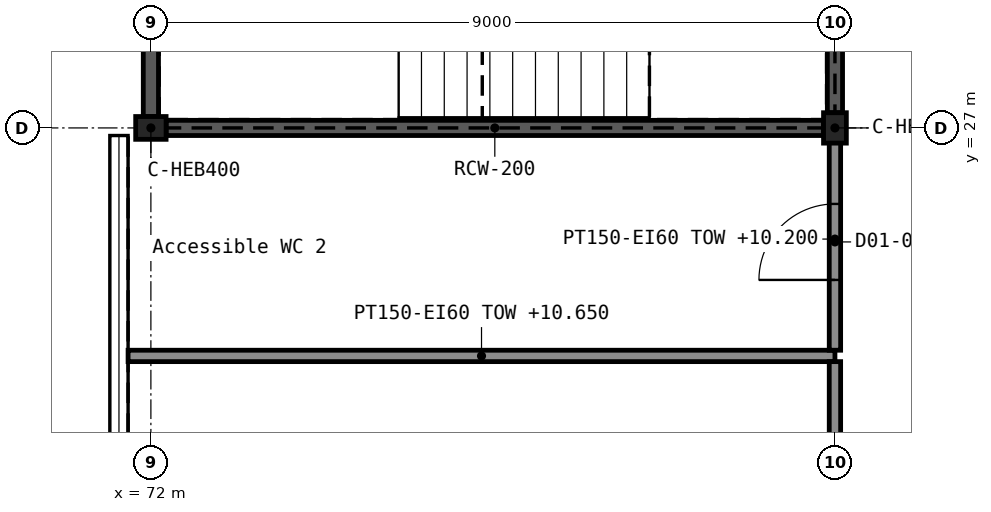
"""IFC4 building model, lengths in metres.
Left out: names, types, materials, properties, quantities, classifications, styles, units other than length and angle.
Written with IfcOpenShell. Run it as: python <this file> out.ifc"""

import sys

from ifc_helpers import new_model, si_unit, direction, frame, frame_2d, origin, origin_2d, place, context, subcontext, project, spatial, rectangle, i_section, extrude, element, fill, save


model = new_model("IFC4")
c1 = context("Model", 3, precision=1e-05, world=origin(), true_north=direction((0.0, 1.0)))
c2 = subcontext(c1, "Body", "Model", "MODEL_VIEW")
j1 = project(units=[si_unit("LENGTHUNIT", "METRE"), si_unit("PLANEANGLEUNIT", "RADIAN")], contexts=[c1])
p1 = place(None, origin())
s1 = spatial("IfcSite", under=j1, at=p1, CompositionType="ELEMENT")
p2 = place(p1, origin())
s2 = spatial("IfcBuilding", under=s1, at=p2, CompositionType="ELEMENT")
p3 = place(p2, frame((0.0, 0.0, 5.4)))
s3 = spatial("IfcBuildingStorey", under=s2, at=p3, CompositionType="ELEMENT", Elevation=5.4)
for number, where, z_axis, x_axis in (
    (1, (72.0, 27.0, 0.0), (0.0, 0.0, 1.0), (0.0, 1.0, 0.0)),
    (2, (81.0, 27.0, 0.0), (0.0, 0.0, 1.0), (1.0, 0.0, 0.0)),
):
    element("IfcColumn", number, at=place(p3, frame(where, z_axis=z_axis, x_axis=x_axis)), inside=s3, PredefinedType="COLUMN", context=c2, shape_type="SweptSolid", body=[
        extrude(i_section(OverallWidth=0.3, OverallDepth=0.4, WebThickness=0.013, FlangeThickness=0.024, FilletRadius=0.027, at=origin_2d()), origin(), (0.0, 0.0, 1.0), 5.4),
    ])
p4 = place(p3, frame((72.2, 27.0, 0.0), z_axis=(0.0, 0.0, 1.0), x_axis=(1.0, 0.0, 0.0)))
e3 = element("IfcWall", 3, at=p4, inside=s3, PredefinedType="SHEAR", context=c2, shape_type="SweptSolid", body=[
    extrude(rectangle(XDim=8.65, YDim=0.2, at=frame_2d((4.325, 0.0))), origin(), (0.0, 0.0, 1.0), 5.4),
])
p5 = place(p3, frame((72.0, 27.15, -0.15), z_axis=(0.0, 0.0, 1.0), x_axis=(0.0, 1.0, 0.0)))
e4 = element("IfcWall", 4, at=p5, inside=s3, PredefinedType="SHEAR", context=c2, shape_type="SweptSolid", body=[
    extrude(rectangle(XDim=8.7, YDim=0.2, at=frame_2d((4.35, 0.0))), origin(), (0.0, 0.0, 1.0), 5.55),
])
p6 = place(p3, frame((81.0, 27.2, 0.0), z_axis=(0.0, 0.0, 1.0), x_axis=(0.0, 1.0, 0.0)))
e5 = element("IfcWall", 5, at=p6, inside=s3, PredefinedType="SHEAR", context=c2, shape_type="SweptSolid", body=[
    extrude(rectangle(XDim=8.6, YDim=0.2, at=frame_2d((4.3, 0.0))), origin(), (0.0, 0.0, 1.0), 5.4),
])
p7 = place(p6, frame((3.7, 0.0, 0.0)))
e6 = element("IfcOpeningElement", 6, at=p7, cuts=e5, PredefinedType="OPENING", context=c2, shape_type="SweptSolid", body=[
    extrude(rectangle(XDim=1.2, YDim=2.1, at=frame_2d((0.6, 1.05))), frame((0.0, 0.111, 0.0), z_axis=(0.0, -1.0, 0.0), x_axis=(1.0, 0.0, 0.0)), (0.0, 0.0, 1.0), 0.222),
])
p8 = place(p3, frame((71.7, 24.0, 0.0), z_axis=(0.0, 0.0, 1.0), x_axis=(1.0, 0.0, 0.0)))
e7 = element("IfcWall", 7, at=p8, inside=s3, PredefinedType="PARTITIONING", context=c2, shape_type="SweptSolid", body=[
    extrude(rectangle(XDim=9.3, YDim=0.15, at=frame_2d((4.65, 0.0))), origin(), (0.0, 0.0, 1.0), 5.25),
])
p9 = place(p3, frame((81.0, 21.075, 0.0), z_axis=(0.0, 0.0, 1.0), x_axis=(0.0, 1.0, 0.0)))
e8 = element("IfcWall", 8, at=p9, inside=s3, PredefinedType="PARTITIONING", context=c2, shape_type="SweptSolid", body=[
    extrude(rectangle(XDim=2.85, YDim=0.15, at=frame_2d((1.425, 0.0))), origin(), (0.0, 0.0, 1.0), 4.8),
])
p10 = place(p9, frame((0.975, 0.0, 0.0)))
e9 = element("IfcOpeningElement", 9, at=p10, cuts=e8, PredefinedType="OPENING", context=c2, shape_type="SweptSolid", body=[
    extrude(rectangle(XDim=0.9, YDim=2.1, at=frame_2d((0.45, 1.05))), frame((0.0, 0.086, 0.0), z_axis=(0.0, -1.0, 0.0), x_axis=(1.0, 0.0, 0.0)), (0.0, 0.0, 1.0), 0.172),
])
p11 = place(p3, frame((81.0, 24.075, 0.0), z_axis=(0.0, 0.0, 1.0), x_axis=(0.0, 1.0, 0.0)))
e10 = element("IfcWall", 10, at=p11, inside=s3, PredefinedType="PARTITIONING", context=c2, shape_type="SweptSolid", body=[
    extrude(rectangle(XDim=2.925, YDim=0.15, at=frame_2d((1.462, 0.0))), origin(), (0.0, 0.0, 1.0), 4.8),
])
p12 = place(p11, frame((0.925, 0.0, 0.0)))
e11 = element("IfcOpeningElement", 11, at=p12, cuts=e10, PredefinedType="OPENING", context=c2, shape_type="SweptSolid", body=[
    extrude(rectangle(XDim=1.0, YDim=2.1, at=frame_2d((0.5, 1.05))), frame((0.0, 0.086, 0.0), z_axis=(0.0, -1.0, 0.0), x_axis=(1.0, 0.0, 0.0)), (0.0, 0.0, 1.0), 0.172),
])
p13 = place(p12, origin())
e12 = element("IfcDoor", 12, at=p13, inside=s3, OperationType="SINGLE_SWING_LEFT", PredefinedType="DOOR", context=c2, shape_type="SweptSolid", body=[
    extrude(rectangle(XDim=1.0, YDim=2.1, at=frame_2d((0.5, 1.05))), frame((0.0, 0.025, 0.0), z_axis=(0.0, -1.0, 0.0), x_axis=(1.0, 0.0, 0.0)), (0.0, 0.0, 1.0), 0.05),
])
fill(e11, e12)
save(model, sys.argv[1])
